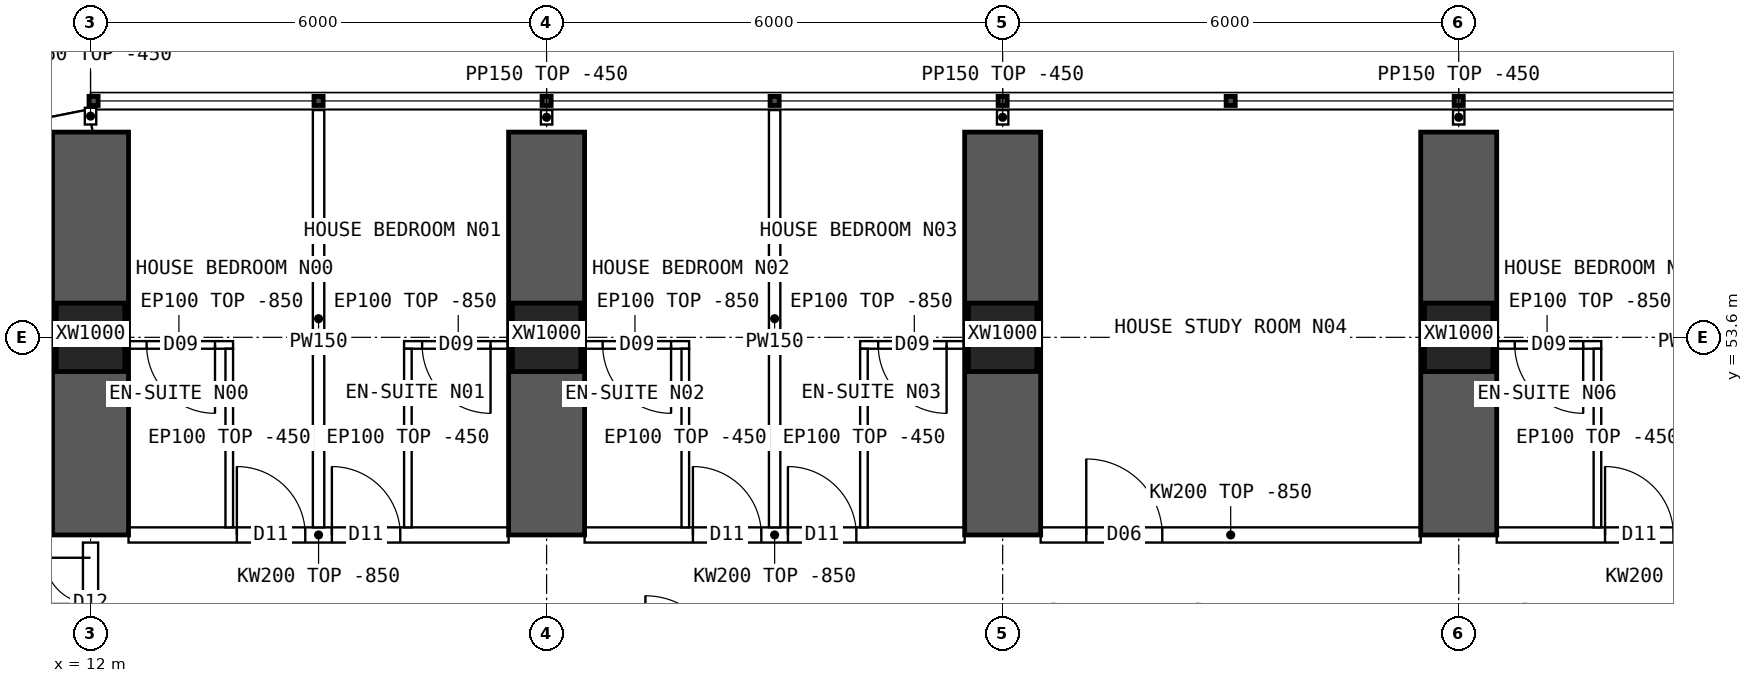
"""IFC4 building model, lengths in metres.
Left out: names, types, materials, properties, quantities, classifications, styles, units other than length and angle.
Written with IfcOpenShell. Run it as: python <this file> out.ifc"""

import sys

from ifc_helpers import new_model, si_unit, direction, frame, frame_2d, origin, origin_2d, place, context, subcontext, project, spatial, polyline, rectangle, hollow_rectangle, outline, extrude, element, fill, save


model = new_model("IFC4")
c1 = context("Model", 3, precision=1e-05, world=origin(), true_north=direction((0.0, 1.0)))
c2 = subcontext(c1, "Body", "Model", "MODEL_VIEW")
j1 = project(units=[si_unit("LENGTHUNIT", "METRE"), si_unit("PLANEANGLEUNIT", "RADIAN")], contexts=[c1])
p1 = place(None, origin())
s1 = spatial("IfcSite", under=j1, at=p1, CompositionType="ELEMENT")
p2 = place(p1, origin())
s2 = spatial("IfcBuilding", under=s1, at=p2, CompositionType="ELEMENT")
p3 = place(p2, frame((0.0, 0.0, 20.2)))
s3 = spatial("IfcBuildingStorey", under=s2, at=p3, CompositionType="ELEMENT", Elevation=20.2)
for number, where, z_axis, x_axis in (
    (1, (12.0, 53.6, 0.0), (0.0, 0.0, 1.0), (1.0, 0.0, 0.0)),
    (2, (18.0, 53.6, 0.0), (0.0, 0.0, 1.0), (1.0, 0.0, 0.0)),
    (3, (24.0, 53.6, 0.0), (0.0, 0.0, 1.0), (1.0, 0.0, 0.0)),
    (4, (30.0, 53.6, 0.0), (0.0, 0.0, 1.0), (1.0, 0.0, 0.0)),
):
    element("IfcColumn", number, at=place(p3, frame(where, z_axis=z_axis, x_axis=x_axis)), inside=s3, PredefinedType="COLUMN", context=c2, shape_type="SweptSolid", body=[
        extrude(hollow_rectangle(XDim=0.9, YDim=0.9, WallThickness=0.09, at=origin_2d()), origin(), (0.0, 0.0, 1.0), 3.75),
    ])
for number, where, z_axis, x_axis in (
    (5, (12.0, 51.0, 0.0), (0.0, 0.0, 1.0), (0.0, 1.0, 0.0)),
    (6, (18.0, 51.0, 0.0), (0.0, 0.0, 1.0), (0.0, 1.0, 0.0)),
    (7, (24.0, 51.0, 0.0), (0.0, 0.0, 1.0), (0.0, 1.0, 0.0)),
    (8, (30.0, 51.0, 0.0), (0.0, 0.0, 1.0), (0.0, 1.0, 0.0)),
):
    element("IfcWall", number, at=place(p3, frame(where, z_axis=z_axis, x_axis=x_axis)), inside=s3, PredefinedType="SHEAR", context=c2, shape_type="SweptSolid", body=[
        extrude(rectangle(XDim=5.3, YDim=1.0, at=frame_2d((2.65, 0.0))), origin(), (0.0, 0.0, 1.0), 3.75),
    ])
p4 = place(p3, frame((12.0, 56.45, 0.0), z_axis=(0.0, 0.0, 1.0), x_axis=(-0.980787251524, -0.195080412259, 0.0)))
e9 = element("IfcWall", 9, at=p4, inside=s3, PredefinedType="SOLIDWALL", context=c2, shape_type="SweptSolid", body=[
    extrude(outline(polyline([(-0.03, -0.15), (3.249, -0.15), (3.189, 0.15), (0.03, 0.15), (-0.03, -0.15)])), origin(), (0.0, 0.0, 1.0), 3.3),
])
p5 = place(p4, frame((0.909, 0.0, 0.9)))
e10 = element("IfcOpeningElement", 10, at=p5, cuts=e9, PredefinedType="OPENING", context=c2, shape_type="SweptSolid", body=[
    extrude(rectangle(XDim=1.4, YDim=1.8, at=frame_2d((0.7, 0.9))), frame((0.0, 0.16, 0.0), z_axis=(0.0, -1.0, 0.0), x_axis=(1.0, 0.0, 0.0)), (0.0, 0.0, 1.0), 0.32),
])
p6 = place(p3, frame((12.5, 51.0, 0.0), z_axis=(0.0, 0.0, 1.0), x_axis=(1.0, 0.0, 0.0)))
e11 = element("IfcWall", 11, at=p6, inside=s3, PredefinedType="SOLIDWALL", context=c2, shape_type="SweptSolid", body=[
    extrude(outline(polyline([(0.0, 0.0), (5.0, 0.0), (5.0, 2.9), (0.0, 2.9), (0.0, 0.0)])), frame((0.0, 0.1, 0.0), z_axis=(0.0, -1.0, 0.0), x_axis=(1.0, 0.0, 0.0)), (0.0, 0.0, 1.0), 0.2),
])
p7 = place(p6, frame((1.425, 0.0, 0.0)))
e12 = element("IfcOpeningElement", 12, at=p7, cuts=e11, PredefinedType="OPENING", context=c2, shape_type="SweptSolid", body=[
    extrude(rectangle(XDim=0.9, YDim=2.1, at=frame_2d((0.45, 1.05))), frame((0.0, 0.11, 0.0), z_axis=(0.0, -1.0, 0.0), x_axis=(1.0, 0.0, 0.0)), (0.0, 0.0, 1.0), 0.22),
])
p8 = place(p6, frame((2.675, 0.0, 0.0)))
e13 = element("IfcOpeningElement", 13, at=p8, cuts=e11, PredefinedType="OPENING", context=c2, shape_type="SweptSolid", body=[
    extrude(rectangle(XDim=0.9, YDim=2.1, at=frame_2d((0.45, 1.05))), frame((0.0, 0.11, 0.0), z_axis=(0.0, -1.0, 0.0), x_axis=(1.0, 0.0, 0.0)), (0.0, 0.0, 1.0), 0.22),
])
p9 = place(p3, frame((18.5, 51.0, 0.0), z_axis=(0.0, 0.0, 1.0), x_axis=(1.0, 0.0, 0.0)))
e14 = element("IfcWall", 14, at=p9, inside=s3, PredefinedType="SOLIDWALL", context=c2, shape_type="SweptSolid", body=[
    extrude(outline(polyline([(0.0, 0.0), (5.0, 0.0), (5.0, 2.9), (0.0, 2.9), (0.0, 0.0)])), frame((0.0, 0.1, 0.0), z_axis=(0.0, -1.0, 0.0), x_axis=(1.0, 0.0, 0.0)), (0.0, 0.0, 1.0), 0.2),
])
p10 = place(p9, frame((1.425, 0.0, 0.0)))
e15 = element("IfcOpeningElement", 15, at=p10, cuts=e14, PredefinedType="OPENING", context=c2, shape_type="SweptSolid", body=[
    extrude(rectangle(XDim=0.9, YDim=2.1, at=frame_2d((0.45, 1.05))), frame((0.0, 0.11, 0.0), z_axis=(0.0, -1.0, 0.0), x_axis=(1.0, 0.0, 0.0)), (0.0, 0.0, 1.0), 0.22),
])
p11 = place(p9, frame((2.675, 0.0, 0.0)))
e16 = element("IfcOpeningElement", 16, at=p11, cuts=e14, PredefinedType="OPENING", context=c2, shape_type="SweptSolid", body=[
    extrude(rectangle(XDim=0.9, YDim=2.1, at=frame_2d((0.45, 1.05))), frame((0.0, 0.11, 0.0), z_axis=(0.0, -1.0, 0.0), x_axis=(1.0, 0.0, 0.0)), (0.0, 0.0, 1.0), 0.22),
])
p12 = place(p3, frame((24.5, 51.0, 0.0), z_axis=(0.0, 0.0, 1.0), x_axis=(1.0, 0.0, 0.0)))
e17 = element("IfcWall", 17, at=p12, inside=s3, PredefinedType="SOLIDWALL", context=c2, shape_type="SweptSolid", body=[
    extrude(outline(polyline([(0.0, 0.0), (5.0, 0.0), (5.0, 2.9), (0.0, 2.9), (0.0, 0.0)])), frame((0.0, 0.1, 0.0), z_axis=(0.0, -1.0, 0.0), x_axis=(1.0, 0.0, 0.0)), (0.0, 0.0, 1.0), 0.2),
])
p13 = place(p12, frame((0.6, 0.0, 0.0)))
e18 = element("IfcOpeningElement", 18, at=p13, cuts=e17, PredefinedType="OPENING", context=c2, shape_type="SweptSolid", body=[
    extrude(rectangle(XDim=1.0, YDim=2.1, at=frame_2d((0.5, 1.05))), frame((0.0, 0.11, 0.0), z_axis=(0.0, -1.0, 0.0), x_axis=(1.0, 0.0, 0.0)), (0.0, 0.0, 1.0), 0.22),
])
p14 = place(p3, frame((30.5, 51.0, 0.0), z_axis=(0.0, 0.0, 1.0), x_axis=(1.0, 0.0, 0.0)))
e19 = element("IfcWall", 19, at=p14, inside=s3, PredefinedType="SOLIDWALL", context=c2, shape_type="SweptSolid", body=[
    extrude(outline(polyline([(0.0, 0.0), (5.0, 0.0), (5.0, 2.9), (0.0, 2.9), (0.0, 0.0)])), frame((0.0, 0.1, 0.0), z_axis=(0.0, -1.0, 0.0), x_axis=(1.0, 0.0, 0.0)), (0.0, 0.0, 1.0), 0.2),
])
p15 = place(p14, frame((1.425, 0.0, 0.0)))
e20 = element("IfcOpeningElement", 20, at=p15, cuts=e19, PredefinedType="OPENING", context=c2, shape_type="SweptSolid", body=[
    extrude(rectangle(XDim=0.9, YDim=2.1, at=frame_2d((0.45, 1.05))), frame((0.0, 0.11, 0.0), z_axis=(0.0, -1.0, 0.0), x_axis=(1.0, 0.0, 0.0)), (0.0, 0.0, 1.0), 0.22),
])
p16 = place(p14, frame((2.675, 0.0, 0.0)))
e21 = element("IfcOpeningElement", 21, at=p16, cuts=e19, PredefinedType="OPENING", context=c2, shape_type="SweptSolid", body=[
    extrude(rectangle(XDim=0.9, YDim=2.1, at=frame_2d((0.45, 1.05))), frame((0.0, 0.11, 0.0), z_axis=(0.0, -1.0, 0.0), x_axis=(1.0, 0.0, 0.0)), (0.0, 0.0, 1.0), 0.22),
])
p17 = place(p3, frame((15.0, 56.59, 0.0), z_axis=(0.0, 0.0, 1.0), x_axis=(0.0, -1.0, 0.0)))
e22 = element("IfcWall", 22, at=p17, inside=s3, PredefinedType="PARTITIONING", context=c2, shape_type="SweptSolid", body=[
    extrude(outline(polyline([(0.0, 0.0), (5.49, 0.0), (5.49, 2.9), (5.442, 2.9), (5.44, 3.3), (3.192, 3.3), (3.19, 2.9), (2.792, 2.9), (2.79, 3.3), (0.0, 3.3), (0.0, 0.0)])), frame((0.0, 0.075, 0.0), z_axis=(0.0, -1.0, 0.0), x_axis=(1.0, 0.0, 0.0)), (0.0, 0.0, 1.0), 0.15),
])
p18 = place(p3, frame((12.45, 53.5, 0.0), z_axis=(0.0, 0.0, 1.0), x_axis=(1.0, 0.0, 0.0)))
e23 = element("IfcWall", 23, at=p18, inside=s3, PredefinedType="PARTITIONING", context=c2, shape_type="SweptSolid", body=[
    extrude(outline(polyline([(0.0, 0.0), (1.425, 0.0), (1.425, 2.9), (0.0, 2.9), (0.0, 0.0)])), frame((0.0, 0.05, 0.0), z_axis=(0.0, -1.0, 0.0), x_axis=(1.0, 0.0, 0.0)), (0.0, 0.0, 1.0), 0.1),
])
p19 = place(p18, frame((0.288, 0.0, 0.0)))
e24 = element("IfcOpeningElement", 24, at=p19, cuts=e23, PredefinedType="OPENING", context=c2, shape_type="SweptSolid", body=[
    extrude(rectangle(XDim=0.9, YDim=2.1, at=frame_2d((0.45, 1.05))), frame((0.0, 0.06, 0.0), z_axis=(0.0, -1.0, 0.0), x_axis=(1.0, 0.0, 0.0)), (0.0, 0.0, 1.0), 0.12),
])
p20 = place(p3, frame((13.825, 53.45, 0.0), z_axis=(0.0, 0.0, 1.0), x_axis=(0.0, -1.0, 0.0)))
e25 = element("IfcWall", 25, at=p20, inside=s3, PredefinedType="PARTITIONING", context=c2, shape_type="SweptSolid", body=[
    extrude(outline(polyline([(0.0, 0.0), (2.35, 0.0), (2.35, 2.9), (2.302, 2.9), (2.3, 3.3), (0.052, 3.3), (0.05, 2.9), (0.0, 2.9), (0.0, 0.0)])), frame((0.0, 0.05, 0.0), z_axis=(0.0, -1.0, 0.0), x_axis=(1.0, 0.0, 0.0)), (0.0, 0.0, 1.0), 0.1),
])
p21 = place(p3, frame((16.125, 53.5, 0.0), z_axis=(0.0, 0.0, 1.0), x_axis=(1.0, 0.0, 0.0)))
e26 = element("IfcWall", 26, at=p21, inside=s3, PredefinedType="PARTITIONING", context=c2, shape_type="SweptSolid", body=[
    extrude(outline(polyline([(0.0, 0.0), (1.425, 0.0), (1.425, 2.9), (0.0, 2.9), (0.0, 0.0)])), frame((0.0, 0.05, 0.0), z_axis=(0.0, -1.0, 0.0), x_axis=(1.0, 0.0, 0.0)), (0.0, 0.0, 1.0), 0.1),
])
p22 = place(p21, frame((0.238, 0.0, 0.0)))
e27 = element("IfcOpeningElement", 27, at=p22, cuts=e26, PredefinedType="OPENING", context=c2, shape_type="SweptSolid", body=[
    extrude(rectangle(XDim=0.9, YDim=2.1, at=frame_2d((0.45, 1.05))), frame((0.0, 0.06, 0.0), z_axis=(0.0, -1.0, 0.0), x_axis=(1.0, 0.0, 0.0)), (0.0, 0.0, 1.0), 0.12),
])
p23 = place(p3, frame((16.175, 53.45, 0.0), z_axis=(0.0, 0.0, 1.0), x_axis=(0.0, -1.0, 0.0)))
e28 = element("IfcWall", 28, at=p23, inside=s3, PredefinedType="PARTITIONING", context=c2, shape_type="SweptSolid", body=[
    extrude(outline(polyline([(0.0, 0.0), (2.35, 0.0), (2.35, 2.9), (2.302, 2.9), (2.3, 3.3), (0.052, 3.3), (0.05, 2.9), (0.0, 2.9), (0.0, 0.0)])), frame((0.0, 0.05, 0.0), z_axis=(0.0, -1.0, 0.0), x_axis=(1.0, 0.0, 0.0)), (0.0, 0.0, 1.0), 0.1),
])
p24 = place(p3, frame((21.0, 56.59, 0.0), z_axis=(0.0, 0.0, 1.0), x_axis=(0.0, -1.0, 0.0)))
e29 = element("IfcWall", 29, at=p24, inside=s3, PredefinedType="PARTITIONING", context=c2, shape_type="SweptSolid", body=[
    extrude(outline(polyline([(0.0, 0.0), (5.49, 0.0), (5.49, 2.9), (5.442, 2.9), (5.44, 3.3), (3.192, 3.3), (3.19, 2.9), (2.792, 2.9), (2.79, 3.3), (0.0, 3.3), (0.0, 0.0)])), frame((0.0, 0.075, 0.0), z_axis=(0.0, -1.0, 0.0), x_axis=(1.0, 0.0, 0.0)), (0.0, 0.0, 1.0), 0.15),
])
p25 = place(p3, frame((18.45, 53.5, 0.0), z_axis=(0.0, 0.0, 1.0), x_axis=(1.0, 0.0, 0.0)))
e30 = element("IfcWall", 30, at=p25, inside=s3, PredefinedType="PARTITIONING", context=c2, shape_type="SweptSolid", body=[
    extrude(outline(polyline([(0.0, 0.0), (1.425, 0.0), (1.425, 2.9), (0.0, 2.9), (0.0, 0.0)])), frame((0.0, 0.05, 0.0), z_axis=(0.0, -1.0, 0.0), x_axis=(1.0, 0.0, 0.0)), (0.0, 0.0, 1.0), 0.1),
])
p26 = place(p25, frame((0.288, 0.0, 0.0)))
e31 = element("IfcOpeningElement", 31, at=p26, cuts=e30, PredefinedType="OPENING", context=c2, shape_type="SweptSolid", body=[
    extrude(rectangle(XDim=0.9, YDim=2.1, at=frame_2d((0.45, 1.05))), frame((0.0, 0.06, 0.0), z_axis=(0.0, -1.0, 0.0), x_axis=(1.0, 0.0, 0.0)), (0.0, 0.0, 1.0), 0.12),
])
p27 = place(p3, frame((19.825, 53.45, 0.0), z_axis=(0.0, 0.0, 1.0), x_axis=(0.0, -1.0, 0.0)))
e32 = element("IfcWall", 32, at=p27, inside=s3, PredefinedType="PARTITIONING", context=c2, shape_type="SweptSolid", body=[
    extrude(outline(polyline([(0.0, 0.0), (2.35, 0.0), (2.35, 2.9), (2.302, 2.9), (2.3, 3.3), (0.052, 3.3), (0.05, 2.9), (0.0, 2.9), (0.0, 0.0)])), frame((0.0, 0.05, 0.0), z_axis=(0.0, -1.0, 0.0), x_axis=(1.0, 0.0, 0.0)), (0.0, 0.0, 1.0), 0.1),
])
p28 = place(p3, frame((22.125, 53.5, 0.0), z_axis=(0.0, 0.0, 1.0), x_axis=(1.0, 0.0, 0.0)))
e33 = element("IfcWall", 33, at=p28, inside=s3, PredefinedType="PARTITIONING", context=c2, shape_type="SweptSolid", body=[
    extrude(outline(polyline([(0.0, 0.0), (1.425, 0.0), (1.425, 2.9), (0.0, 2.9), (0.0, 0.0)])), frame((0.0, 0.05, 0.0), z_axis=(0.0, -1.0, 0.0), x_axis=(1.0, 0.0, 0.0)), (0.0, 0.0, 1.0), 0.1),
])
p29 = place(p28, frame((0.238, 0.0, 0.0)))
e34 = element("IfcOpeningElement", 34, at=p29, cuts=e33, PredefinedType="OPENING", context=c2, shape_type="SweptSolid", body=[
    extrude(rectangle(XDim=0.9, YDim=2.1, at=frame_2d((0.45, 1.05))), frame((0.0, 0.06, 0.0), z_axis=(0.0, -1.0, 0.0), x_axis=(1.0, 0.0, 0.0)), (0.0, 0.0, 1.0), 0.12),
])
p30 = place(p3, frame((22.175, 53.45, 0.0), z_axis=(0.0, 0.0, 1.0), x_axis=(0.0, -1.0, 0.0)))
e35 = element("IfcWall", 35, at=p30, inside=s3, PredefinedType="PARTITIONING", context=c2, shape_type="SweptSolid", body=[
    extrude(outline(polyline([(0.0, 0.0), (2.35, 0.0), (2.35, 2.9), (2.302, 2.9), (2.3, 3.3), (0.052, 3.3), (0.05, 2.9), (0.0, 2.9), (0.0, 0.0)])), frame((0.0, 0.05, 0.0), z_axis=(0.0, -1.0, 0.0), x_axis=(1.0, 0.0, 0.0)), (0.0, 0.0, 1.0), 0.1),
])
p31 = place(p3, frame((30.45, 53.5, 0.0), z_axis=(0.0, 0.0, 1.0), x_axis=(1.0, 0.0, 0.0)))
e36 = element("IfcWall", 36, at=p31, inside=s3, PredefinedType="PARTITIONING", context=c2, shape_type="SweptSolid", body=[
    extrude(outline(polyline([(0.0, 0.0), (1.425, 0.0), (1.425, 2.9), (0.0, 2.9), (0.0, 0.0)])), frame((0.0, 0.05, 0.0), z_axis=(0.0, -1.0, 0.0), x_axis=(1.0, 0.0, 0.0)), (0.0, 0.0, 1.0), 0.1),
])
p32 = place(p31, frame((0.288, 0.0, 0.0)))
e37 = element("IfcOpeningElement", 37, at=p32, cuts=e36, PredefinedType="OPENING", context=c2, shape_type="SweptSolid", body=[
    extrude(rectangle(XDim=0.9, YDim=2.1, at=frame_2d((0.45, 1.05))), frame((0.0, 0.06, 0.0), z_axis=(0.0, -1.0, 0.0), x_axis=(1.0, 0.0, 0.0)), (0.0, 0.0, 1.0), 0.12),
])
p33 = place(p3, frame((31.825, 53.45, 0.0), z_axis=(0.0, 0.0, 1.0), x_axis=(0.0, -1.0, 0.0)))
e38 = element("IfcWall", 38, at=p33, inside=s3, PredefinedType="PARTITIONING", context=c2, shape_type="SweptSolid", body=[
    extrude(outline(polyline([(0.0, 0.0), (2.35, 0.0), (2.35, 2.9), (2.302, 2.9), (2.3, 3.3), (0.052, 3.3), (0.05, 2.9), (0.0, 2.9), (0.0, 0.0)])), frame((0.0, 0.05, 0.0), z_axis=(0.0, -1.0, 0.0), x_axis=(1.0, 0.0, 0.0)), (0.0, 0.0, 1.0), 0.1),
])
p34 = place(p3, frame((12.0, 49.3, 0.0), z_axis=(0.0, 0.0, 1.0), x_axis=(0.0, 1.0, 0.0)))
e39 = element("IfcWall", 39, at=p34, inside=s3, PredefinedType="SOLIDWALL", context=c2, shape_type="SweptSolid", body=[
    extrude(outline(polyline([(0.0, 0.0), (1.6, 0.0), (1.6, 2.85), (0.0, 2.85), (0.0, 0.0)])), frame((0.0, 0.1, 0.0), z_axis=(0.0, -1.0, 0.0), x_axis=(1.0, 0.0, 0.0)), (0.0, 0.0, 1.0), 0.2),
])
p35 = place(p34, frame((0.2, 0.0, 0.0)))
e40 = element("IfcOpeningElement", 40, at=p35, cuts=e39, PredefinedType="OPENING", context=c2, shape_type="SweptSolid", body=[
    extrude(rectangle(XDim=1.2, YDim=2.1, at=frame_2d((0.6, 1.05))), frame((0.0, 0.11, 0.0), z_axis=(0.0, -1.0, 0.0), x_axis=(1.0, 0.0, 0.0)), (0.0, 0.0, 1.0), 0.22),
])
p36 = place(p3, frame((12.0, 56.4, 0.0), z_axis=(0.0, 0.0, 1.0), x_axis=(0.0, 1.0, 0.0)))
e41 = element("IfcWall", 41, at=p36, inside=s3, PredefinedType="PARTITIONING", context=c2, shape_type="SweptSolid", body=[
    extrude(rectangle(XDim=0.22, YDim=0.15, at=frame_2d((0.11, 0.0))), origin(), (0.0, 0.0, 1.0), 3.3),
])
for number, where, z_axis, x_axis in (
    (42, (18.0, 56.4, 0.0), (0.0, 0.0, 1.0), (0.0, 1.0, 0.0)),
    (43, (24.0, 56.4, 0.0), (0.0, 0.0, 1.0), (0.0, 1.0, 0.0)),
    (44, (30.0, 56.4, 0.0), (0.0, 0.0, 1.0), (0.0, 1.0, 0.0)),
):
    element("IfcWall", number, at=place(p3, frame(where, z_axis=z_axis, x_axis=x_axis)), inside=s3, PredefinedType="PARTITIONING", context=c2, shape_type="SweptSolid", body=[
        extrude(rectangle(XDim=0.19, YDim=0.15, at=frame_2d((0.095, 0.0))), origin(), (0.0, 0.0, 1.0), 3.3),
    ])
p37 = place(p19, origin())
e45 = element("IfcDoor", 45, at=p37, inside=s3, OperationType="SINGLE_SWING_RIGHT", PredefinedType="DOOR", context=c2, shape_type="SweptSolid", body=[
    extrude(rectangle(XDim=0.9, YDim=2.1, at=frame_2d((0.45, 1.05))), frame((0.0, 0.025, 0.0), z_axis=(0.0, -1.0, 0.0), x_axis=(1.0, 0.0, 0.0)), (0.0, 0.0, 1.0), 0.05),
])
fill(e24, e45)
p38 = place(p7, origin())
e46 = element("IfcDoor", 46, at=p38, inside=s3, OperationType="SINGLE_SWING_LEFT", PredefinedType="DOOR", context=c2, shape_type="SweptSolid", body=[
    extrude(rectangle(XDim=0.9, YDim=2.1, at=frame_2d((0.45, 1.05))), frame((0.0, 0.025, 0.0), z_axis=(0.0, -1.0, 0.0), x_axis=(1.0, 0.0, 0.0)), (0.0, 0.0, 1.0), 0.05),
])
fill(e12, e46)
p39 = place(p22, origin())
e47 = element("IfcDoor", 47, at=p39, inside=s3, OperationType="SINGLE_SWING_RIGHT", PredefinedType="DOOR", context=c2, shape_type="SweptSolid", body=[
    extrude(rectangle(XDim=0.9, YDim=2.1, at=frame_2d((0.45, 1.05))), frame((0.0, 0.025, 0.0), z_axis=(0.0, -1.0, 0.0), x_axis=(1.0, 0.0, 0.0)), (0.0, 0.0, 1.0), 0.05),
])
fill(e27, e47)
p40 = place(p8, origin())
e48 = element("IfcDoor", 48, at=p40, inside=s3, OperationType="SINGLE_SWING_LEFT", PredefinedType="DOOR", context=c2, shape_type="SweptSolid", body=[
    extrude(rectangle(XDim=0.9, YDim=2.1, at=frame_2d((0.45, 1.05))), frame((0.0, 0.025, 0.0), z_axis=(0.0, -1.0, 0.0), x_axis=(1.0, 0.0, 0.0)), (0.0, 0.0, 1.0), 0.05),
])
fill(e13, e48)
p41 = place(p26, origin())
e49 = element("IfcDoor", 49, at=p41, inside=s3, OperationType="SINGLE_SWING_RIGHT", PredefinedType="DOOR", context=c2, shape_type="SweptSolid", body=[
    extrude(rectangle(XDim=0.9, YDim=2.1, at=frame_2d((0.45, 1.05))), frame((0.0, 0.025, 0.0), z_axis=(0.0, -1.0, 0.0), x_axis=(1.0, 0.0, 0.0)), (0.0, 0.0, 1.0), 0.05),
])
fill(e31, e49)
p42 = place(p10, origin())
e50 = element("IfcDoor", 50, at=p42, inside=s3, OperationType="SINGLE_SWING_LEFT", PredefinedType="DOOR", context=c2, shape_type="SweptSolid", body=[
    extrude(rectangle(XDim=0.9, YDim=2.1, at=frame_2d((0.45, 1.05))), frame((0.0, 0.025, 0.0), z_axis=(0.0, -1.0, 0.0), x_axis=(1.0, 0.0, 0.0)), (0.0, 0.0, 1.0), 0.05),
])
fill(e15, e50)
p43 = place(p29, origin())
e51 = element("IfcDoor", 51, at=p43, inside=s3, OperationType="SINGLE_SWING_RIGHT", PredefinedType="DOOR", context=c2, shape_type="SweptSolid", body=[
    extrude(rectangle(XDim=0.9, YDim=2.1, at=frame_2d((0.45, 1.05))), frame((0.0, 0.025, 0.0), z_axis=(0.0, -1.0, 0.0), x_axis=(1.0, 0.0, 0.0)), (0.0, 0.0, 1.0), 0.05),
])
fill(e34, e51)
p44 = place(p11, origin())
e52 = element("IfcDoor", 52, at=p44, inside=s3, OperationType="SINGLE_SWING_LEFT", PredefinedType="DOOR", context=c2, shape_type="SweptSolid", body=[
    extrude(rectangle(XDim=0.9, YDim=2.1, at=frame_2d((0.45, 1.05))), frame((0.0, 0.025, 0.0), z_axis=(0.0, -1.0, 0.0), x_axis=(1.0, 0.0, 0.0)), (0.0, 0.0, 1.0), 0.05),
])
fill(e16, e52)
p45 = place(p13, origin())
e53 = element("IfcDoor", 53, at=p45, inside=s3, OperationType="SINGLE_SWING_LEFT", PredefinedType="DOOR", context=c2, shape_type="SweptSolid", body=[
    extrude(rectangle(XDim=1.0, YDim=2.1, at=frame_2d((0.5, 1.05))), frame((0.0, 0.025, 0.0), z_axis=(0.0, -1.0, 0.0), x_axis=(1.0, 0.0, 0.0)), (0.0, 0.0, 1.0), 0.05),
])
fill(e18, e53)
p46 = place(p32, origin())
e54 = element("IfcDoor", 54, at=p46, inside=s3, OperationType="SINGLE_SWING_RIGHT", PredefinedType="DOOR", context=c2, shape_type="SweptSolid", body=[
    extrude(rectangle(XDim=0.9, YDim=2.1, at=frame_2d((0.45, 1.05))), frame((0.0, 0.025, 0.0), z_axis=(0.0, -1.0, 0.0), x_axis=(1.0, 0.0, 0.0)), (0.0, 0.0, 1.0), 0.05),
])
fill(e37, e54)
p47 = place(p15, origin())
e55 = element("IfcDoor", 55, at=p47, inside=s3, OperationType="SINGLE_SWING_LEFT", PredefinedType="DOOR", context=c2, shape_type="SweptSolid", body=[
    extrude(rectangle(XDim=0.9, YDim=2.1, at=frame_2d((0.45, 1.05))), frame((0.0, 0.025, 0.0), z_axis=(0.0, -1.0, 0.0), x_axis=(1.0, 0.0, 0.0)), (0.0, 0.0, 1.0), 0.05),
])
fill(e20, e55)
p48 = place(p35, origin())
e56 = element("IfcDoor", 56, at=p48, inside=s3, OperationType="DOUBLE_DOOR_SINGLE_SWING", PredefinedType="DOOR", context=c2, shape_type="SweptSolid", body=[
    extrude(rectangle(XDim=1.2, YDim=2.1, at=frame_2d((0.6, 1.05))), frame((0.0, 0.025, 0.0), z_axis=(0.0, -1.0, 0.0), x_axis=(1.0, 0.0, 0.0)), (0.0, 0.0, 1.0), 0.05),
])
fill(e40, e56)
save(model, sys.argv[1])
